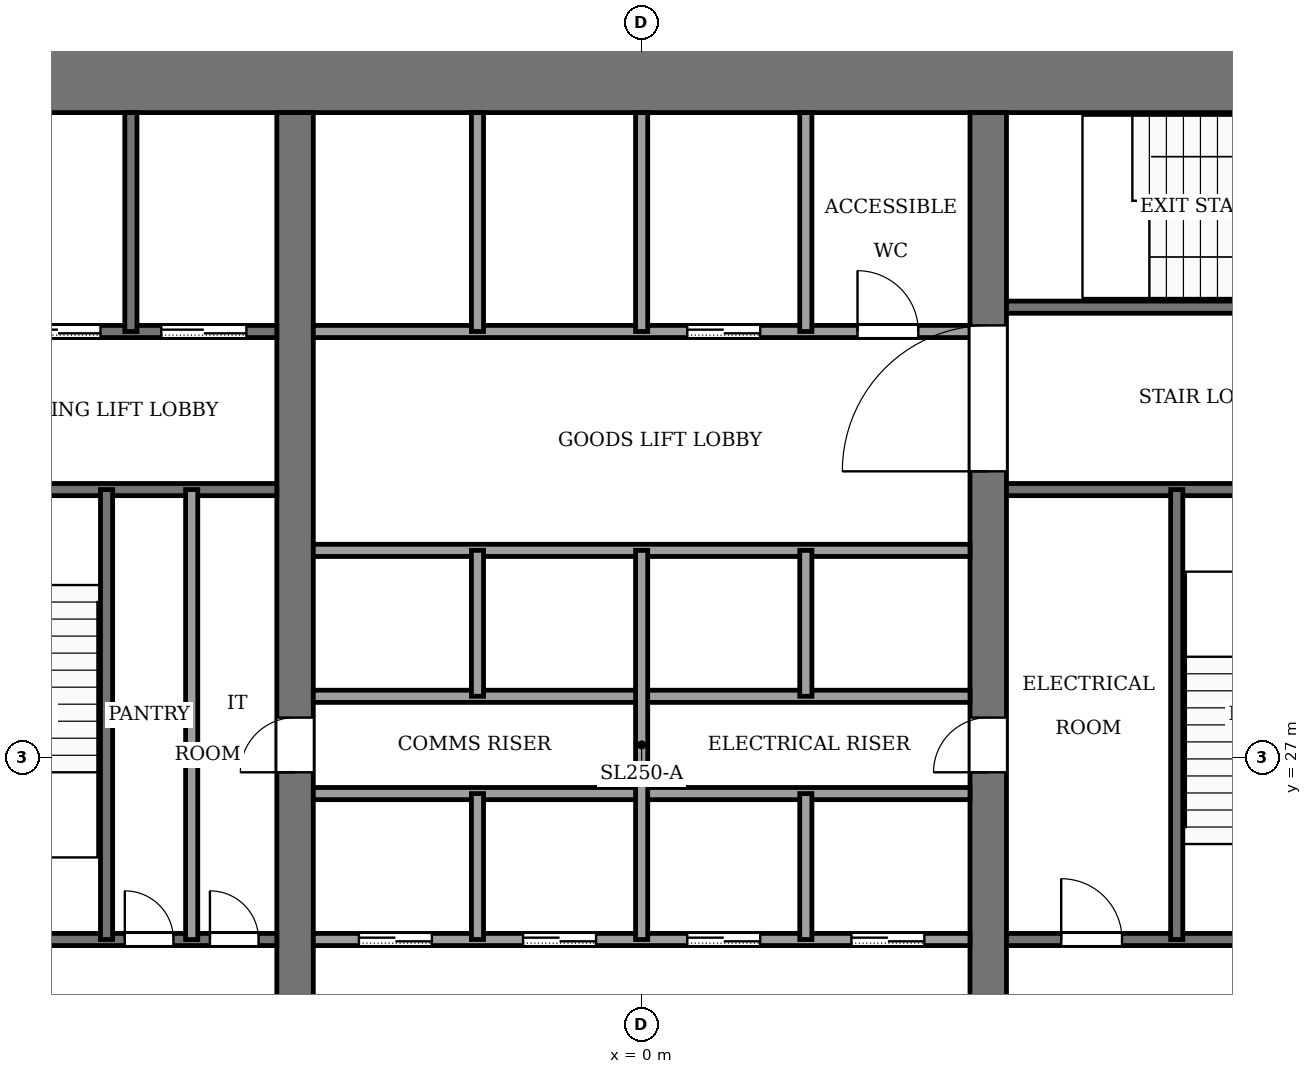
"""IFC4 building model, lengths in metres.
Left out: names, types, materials, properties, quantities, classifications, styles, units other than length and angle.
Written with IfcOpenShell. Run it as: python <this file> out.ifc"""

import sys

from ifc_helpers import new_model, si_unit, direction, frame, frame_2d, origin, place, context, subcontext, project, spatial, rectangle, extrude, element, fill, save


model = new_model("IFC4")
c1 = context("Model", 3, precision=1e-05, world=origin(), true_north=direction((0.0, 1.0)))
c2 = subcontext(c1, "Body", "Model", "MODEL_VIEW")
j1 = project(units=[si_unit("LENGTHUNIT", "METRE"), si_unit("PLANEANGLEUNIT", "RADIAN")], contexts=[c1])
p1 = place(None, origin())
s1 = spatial("IfcSite", under=j1, at=p1, CompositionType="ELEMENT")
p2 = place(p1, origin())
s2 = spatial("IfcBuilding", under=s1, at=p2, CompositionType="ELEMENT")
p3 = place(p2, frame((0.0, 0.0, 90.0)))
s3 = spatial("IfcBuildingStorey", under=s2, at=p3, CompositionType="ELEMENT", Elevation=90.0)
p4 = place(p3, frame((-13.8, 38.2, -0.13), z_axis=(0.0, 0.0, 1.0), x_axis=(1.0, 0.0, 0.0)))
e1 = element("IfcWall", 1, at=p4, inside=s3, PredefinedType="SHEAR", context=c2, shape_type="SweptSolid", body=[
    extrude(rectangle(XDim=27.6, YDim=1.2, at=frame_2d((13.8, 0.0))), origin(), (0.0, 0.0, 1.0), 4.0),
])
p5 = place(p3, frame((-5.7, 18.4, -0.13), z_axis=(0.0, 0.0, 1.0), x_axis=(0.0, 1.0, 0.0)))
e2 = element("IfcWall", 2, at=p5, inside=s3, PredefinedType="SHEAR", context=c2, shape_type="SweptSolid", body=[
    extrude(rectangle(XDim=19.2, YDim=0.6, at=frame_2d((9.6, 0.0))), origin(), (0.0, 0.0, 1.0), 4.0),
])
p6 = place(p5, frame((8.35, 0.0, 0.13)))
e3 = element("IfcOpeningElement", 3, at=p6, cuts=e2, PredefinedType="OPENING", context=c2, shape_type="SweptSolid", body=[
    extrude(rectangle(XDim=0.9, YDim=2.1, at=frame_2d((0.45, 1.05))), frame((0.0, 0.31, 0.0), z_axis=(0.0, -1.0, 0.0), x_axis=(1.0, 0.0, 0.0)), (0.0, 0.0, 1.0), 0.62),
])
p7 = place(p3, frame((5.7, 18.4, -0.13), z_axis=(0.0, 0.0, 1.0), x_axis=(0.0, 1.0, 0.0)))
e4 = element("IfcWall", 4, at=p7, inside=s3, PredefinedType="SHEAR", context=c2, shape_type="SweptSolid", body=[
    extrude(rectangle(XDim=19.2, YDim=0.6, at=frame_2d((9.6, 0.0))), origin(), (0.0, 0.0, 1.0), 4.0),
])
p8 = place(p7, frame((8.35, 0.0, 0.13)))
e5 = element("IfcOpeningElement", 5, at=p8, cuts=e4, PredefinedType="OPENING", context=c2, shape_type="SweptSolid", body=[
    extrude(rectangle(XDim=0.9, YDim=2.1, at=frame_2d((0.45, 1.05))), frame((0.0, 0.31, 0.0), z_axis=(0.0, -1.0, 0.0), x_axis=(1.0, 0.0, 0.0)), (0.0, 0.0, 1.0), 0.62),
])
p9 = place(p7, frame((13.3, 0.0, 0.13)))
e6 = element("IfcOpeningElement", 6, at=p9, cuts=e4, PredefinedType="OPENING", context=c2, shape_type="SweptSolid", body=[
    extrude(rectangle(XDim=2.4, YDim=2.4, at=frame_2d((1.2, 1.2))), frame((0.0, 0.31, 0.0), z_axis=(0.0, -1.0, 0.0), x_axis=(1.0, 0.0, 0.0)), (0.0, 0.0, 1.0), 0.62),
])
p10 = place(p3, frame((-12.6, 24.0, 0.0), z_axis=(0.0, 0.0, 1.0), x_axis=(1.0, 0.0, 0.0)))
e7 = element("IfcWall", 7, at=p10, inside=s3, PredefinedType="PARTITIONING", context=c2, shape_type="SweptSolid", body=[
    extrude(rectangle(XDim=6.6, YDim=0.2, at=frame_2d((3.3, 0.0))), origin(), (0.0, 0.0, 1.0), 3.87),
])
p11 = place(p10, frame((4.1, 0.0, 0.0)))
e8 = element("IfcOpeningElement", 8, at=p11, cuts=e7, PredefinedType="OPENING", context=c2, shape_type="SweptSolid", body=[
    extrude(rectangle(XDim=0.8, YDim=2.1, at=frame_2d((0.4, 1.05))), frame((0.0, 0.11, 0.0), z_axis=(0.0, -1.0, 0.0), x_axis=(1.0, 0.0, 0.0)), (0.0, 0.0, 1.0), 0.22),
])
p12 = place(p10, frame((5.5, 0.0, 0.0)))
e9 = element("IfcOpeningElement", 9, at=p12, cuts=e7, PredefinedType="OPENING", context=c2, shape_type="SweptSolid", body=[
    extrude(rectangle(XDim=0.8, YDim=2.1, at=frame_2d((0.4, 1.05))), frame((0.0, 0.11, 0.0), z_axis=(0.0, -1.0, 0.0), x_axis=(1.0, 0.0, 0.0)), (0.0, 0.0, 1.0), 0.22),
])
p13 = place(p3, frame((-5.4, 24.0, 0.0), z_axis=(0.0, 0.0, 1.0), x_axis=(1.0, 0.0, 0.0)))
e10 = element("IfcWall", 10, at=p13, inside=s3, PredefinedType="PARTITIONING", context=c2, shape_type="SweptSolid", body=[
    extrude(rectangle(XDim=10.8, YDim=0.2, at=frame_2d((5.4, 0.0))), origin(), (0.0, 0.0, 1.0), 3.87),
])
p14 = place(p13, frame((0.75, 0.0, 0.0)))
e11 = element("IfcOpeningElement", 11, at=p14, cuts=e10, PredefinedType="OPENING", context=c2, shape_type="SweptSolid", body=[
    extrude(rectangle(XDim=1.2, YDim=2.2, at=frame_2d((0.6, 1.1))), frame((0.0, 0.11, 0.0), z_axis=(0.0, -1.0, 0.0), x_axis=(1.0, 0.0, 0.0)), (0.0, 0.0, 1.0), 0.22),
])
p15 = place(p13, frame((3.45, 0.0, 0.0)))
e12 = element("IfcOpeningElement", 12, at=p15, cuts=e10, PredefinedType="OPENING", context=c2, shape_type="SweptSolid", body=[
    extrude(rectangle(XDim=1.2, YDim=2.2, at=frame_2d((0.6, 1.1))), frame((0.0, 0.11, 0.0), z_axis=(0.0, -1.0, 0.0), x_axis=(1.0, 0.0, 0.0)), (0.0, 0.0, 1.0), 0.22),
])
p16 = place(p13, frame((6.15, 0.0, 0.0)))
e13 = element("IfcOpeningElement", 13, at=p16, cuts=e10, PredefinedType="OPENING", context=c2, shape_type="SweptSolid", body=[
    extrude(rectangle(XDim=1.2, YDim=2.2, at=frame_2d((0.6, 1.1))), frame((0.0, 0.11, 0.0), z_axis=(0.0, -1.0, 0.0), x_axis=(1.0, 0.0, 0.0)), (0.0, 0.0, 1.0), 0.22),
])
p17 = place(p13, frame((8.85, 0.0, 0.0)))
e14 = element("IfcOpeningElement", 14, at=p17, cuts=e10, PredefinedType="OPENING", context=c2, shape_type="SweptSolid", body=[
    extrude(rectangle(XDim=1.2, YDim=2.2, at=frame_2d((0.6, 1.1))), frame((0.0, 0.11, 0.0), z_axis=(0.0, -1.0, 0.0), x_axis=(1.0, 0.0, 0.0)), (0.0, 0.0, 1.0), 0.22),
])
p18 = place(p3, frame((6.0, 24.0, 0.0), z_axis=(0.0, 0.0, 1.0), x_axis=(1.0, 0.0, 0.0)))
e15 = element("IfcWall", 15, at=p18, inside=s3, PredefinedType="PARTITIONING", context=c2, shape_type="SweptSolid", body=[
    extrude(rectangle(XDim=6.6, YDim=0.2, at=frame_2d((3.3, 0.0))), origin(), (0.0, 0.0, 1.0), 3.87),
])
p19 = place(p18, frame((0.9, 0.0, 0.0)))
e16 = element("IfcOpeningElement", 16, at=p19, cuts=e15, PredefinedType="OPENING", context=c2, shape_type="SweptSolid", body=[
    extrude(rectangle(XDim=1.0, YDim=2.1, at=frame_2d((0.5, 1.05))), frame((0.0, 0.11, 0.0), z_axis=(0.0, -1.0, 0.0), x_axis=(1.0, 0.0, 0.0)), (0.0, 0.0, 1.0), 0.22),
])
p20 = place(p18, frame((4.4, 0.0, 0.0)))
e17 = element("IfcOpeningElement", 17, at=p20, cuts=e15, PredefinedType="OPENING", context=c2, shape_type="SweptSolid", body=[
    extrude(rectangle(XDim=1.2, YDim=2.2, at=frame_2d((0.6, 1.1))), frame((0.0, 0.11, 0.0), z_axis=(0.0, -1.0, 0.0), x_axis=(1.0, 0.0, 0.0)), (0.0, 0.0, 1.0), 0.22),
])
for number, where, z_axis, x_axis in (
    (18, (-5.4, 26.4, 0.0), (0.0, 0.0, 1.0), (1.0, 0.0, 0.0)),
    (19, (-5.4, 28.0, 0.0), (0.0, 0.0, 1.0), (1.0, 0.0, 0.0)),
    (20, (-5.4, 30.4, 0.0), (0.0, 0.0, 1.0), (1.0, 0.0, 0.0)),
):
    element("IfcWall", number, at=place(p3, frame(where, z_axis=z_axis, x_axis=x_axis)), inside=s3, PredefinedType="PARTITIONING", context=c2, shape_type="SweptSolid", body=[
        extrude(rectangle(XDim=10.8, YDim=0.2, at=frame_2d((5.4, 0.0))), origin(), (0.0, 0.0, 1.0), 3.87),
    ])
p21 = place(p3, frame((-12.6, 31.4, 0.0), z_axis=(0.0, 0.0, 1.0), x_axis=(1.0, 0.0, 0.0)))
e21 = element("IfcWall", 21, at=p21, inside=s3, PredefinedType="PARTITIONING", context=c2, shape_type="SweptSolid", body=[
    extrude(rectangle(XDim=6.6, YDim=0.2, at=frame_2d((3.3, 0.0))), origin(), (0.0, 0.0, 1.0), 3.87),
])
p22 = place(p21, frame((1.0, 0.0, 0.0)))
e22 = element("IfcOpeningElement", 22, at=p22, cuts=e21, PredefinedType="OPENING", context=c2, shape_type="SweptSolid", body=[
    extrude(rectangle(XDim=1.2, YDim=2.2, at=frame_2d((0.6, 1.1))), frame((0.0, 0.11, 0.0), z_axis=(0.0, -1.0, 0.0), x_axis=(1.0, 0.0, 0.0)), (0.0, 0.0, 1.0), 0.22),
])
p23 = place(p3, frame((6.0, 31.4, 0.0), z_axis=(0.0, 0.0, 1.0), x_axis=(1.0, 0.0, 0.0)))
e23 = element("IfcWall", 23, at=p23, inside=s3, PredefinedType="PARTITIONING", context=c2, shape_type="SweptSolid", body=[
    extrude(rectangle(XDim=6.6, YDim=0.2, at=frame_2d((3.3, 0.0))), origin(), (0.0, 0.0, 1.0), 3.87),
])
p24 = place(p3, frame((-12.6, 34.0, 0.0), z_axis=(0.0, 0.0, 1.0), x_axis=(1.0, 0.0, 0.0)))
e24 = element("IfcWall", 24, at=p24, inside=s3, PredefinedType="PARTITIONING", context=c2, shape_type="SweptSolid", body=[
    extrude(rectangle(XDim=6.6, YDim=0.2, at=frame_2d((3.3, 0.0))), origin(), (0.0, 0.0, 1.0), 3.87),
])
p25 = place(p24, frame((4.7, 0.0, 0.0)))
e25 = element("IfcOpeningElement", 25, at=p25, cuts=e24, PredefinedType="OPENING", context=c2, shape_type="SweptSolid", body=[
    extrude(rectangle(XDim=1.4, YDim=2.2, at=frame_2d((0.7, 1.1))), frame((0.0, 0.11, 0.0), z_axis=(0.0, -1.0, 0.0), x_axis=(1.0, 0.0, 0.0)), (0.0, 0.0, 1.0), 0.22),
])
p26 = place(p24, frame((2.3, 0.0, 0.0)))
e26 = element("IfcOpeningElement", 26, at=p26, cuts=e24, PredefinedType="OPENING", context=c2, shape_type="SweptSolid", body=[
    extrude(rectangle(XDim=1.4, YDim=2.2, at=frame_2d((0.7, 1.1))), frame((0.0, 0.11, 0.0), z_axis=(0.0, -1.0, 0.0), x_axis=(1.0, 0.0, 0.0)), (0.0, 0.0, 1.0), 0.22),
])
p27 = place(p24, frame((0.45, 0.0, 0.0)))
e27 = element("IfcOpeningElement", 27, at=p27, cuts=e24, PredefinedType="OPENING", context=c2, shape_type="SweptSolid", body=[
    extrude(rectangle(XDim=0.9, YDim=2.1, at=frame_2d((0.45, 1.05))), frame((0.0, 0.11, 0.0), z_axis=(0.0, -1.0, 0.0), x_axis=(1.0, 0.0, 0.0)), (0.0, 0.0, 1.0), 0.22),
])
p28 = place(p3, frame((-5.4, 34.0, 0.0), z_axis=(0.0, 0.0, 1.0), x_axis=(1.0, 0.0, 0.0)))
e28 = element("IfcWall", 28, at=p28, inside=s3, PredefinedType="PARTITIONING", context=c2, shape_type="SweptSolid", body=[
    extrude(rectangle(XDim=10.8, YDim=0.2, at=frame_2d((5.4, 0.0))), origin(), (0.0, 0.0, 1.0), 3.87),
])
p29 = place(p28, frame((6.15, 0.0, 0.0)))
e29 = element("IfcOpeningElement", 29, at=p29, cuts=e28, PredefinedType="OPENING", context=c2, shape_type="SweptSolid", body=[
    extrude(rectangle(XDim=1.2, YDim=2.2, at=frame_2d((0.6, 1.1))), frame((0.0, 0.11, 0.0), z_axis=(0.0, -1.0, 0.0), x_axis=(1.0, 0.0, 0.0)), (0.0, 0.0, 1.0), 0.22),
])
p30 = place(p28, frame((8.95, 0.0, 0.0)))
e30 = element("IfcOpeningElement", 30, at=p30, cuts=e28, PredefinedType="OPENING", context=c2, shape_type="SweptSolid", body=[
    extrude(rectangle(XDim=1.0, YDim=2.1, at=frame_2d((0.5, 1.05))), frame((0.0, 0.11, 0.0), z_axis=(0.0, -1.0, 0.0), x_axis=(1.0, 0.0, 0.0)), (0.0, 0.0, 1.0), 0.22),
])
p31 = place(p3, frame((6.0, 34.4, 0.0), z_axis=(0.0, 0.0, 1.0), x_axis=(1.0, 0.0, 0.0)))
e31 = element("IfcWall", 31, at=p31, inside=s3, PredefinedType="PARTITIONING", context=c2, shape_type="SweptSolid", body=[
    extrude(rectangle(XDim=6.6, YDim=0.2, at=frame_2d((3.3, 0.0))), origin(), (0.0, 0.0, 1.0), 3.87),
])
p32 = place(p31, frame((4.8, 0.0, 0.0)))
e32 = element("IfcOpeningElement", 32, at=p32, cuts=e31, PredefinedType="OPENING", context=c2, shape_type="SweptSolid", body=[
    extrude(rectangle(XDim=1.2, YDim=2.2, at=frame_2d((0.6, 1.1))), frame((0.0, 0.11, 0.0), z_axis=(0.0, -1.0, 0.0), x_axis=(1.0, 0.0, 0.0)), (0.0, 0.0, 1.0), 0.22),
])
p33 = place(p3, frame((-8.8, 24.0, 0.0), z_axis=(0.0, 0.0, 1.0), x_axis=(0.0, 1.0, 0.0)))
e33 = element("IfcWall", 33, at=p33, inside=s3, PredefinedType="PARTITIONING", context=c2, shape_type="SweptSolid", body=[
    extrude(rectangle(XDim=7.4, YDim=0.2, at=frame_2d((3.7, 0.0))), origin(), (0.0, 0.0, 1.0), 3.87),
])
p34 = place(p3, frame((-8.4, 34.0, 0.0), z_axis=(0.0, 0.0, 1.0), x_axis=(0.0, 1.0, 0.0)))
e34 = element("IfcWall", 34, at=p34, inside=s3, PredefinedType="PARTITIONING", context=c2, shape_type="SweptSolid", body=[
    extrude(rectangle(XDim=3.6, YDim=0.2, at=frame_2d((1.8, 0.0))), origin(), (0.0, 0.0, 1.0), 3.87),
])
p35 = place(p3, frame((-7.4, 24.0, 0.0), z_axis=(0.0, 0.0, 1.0), x_axis=(0.0, 1.0, 0.0)))
e35 = element("IfcWall", 35, at=p35, inside=s3, PredefinedType="PARTITIONING", context=c2, shape_type="SweptSolid", body=[
    extrude(rectangle(XDim=7.4, YDim=0.2, at=frame_2d((3.7, 0.0))), origin(), (0.0, 0.0, 1.0), 3.87),
])
for number, where, z_axis, x_axis in (
    (36, (-2.7, 24.0, 0.0), (0.0, 0.0, 1.0), (0.0, 1.0, 0.0)),
    (37, (-2.7, 28.0, 0.0), (0.0, 0.0, 1.0), (0.0, 1.0, 0.0)),
):
    element("IfcWall", number, at=place(p3, frame(where, z_axis=z_axis, x_axis=x_axis)), inside=s3, PredefinedType="PARTITIONING", context=c2, shape_type="SweptSolid", body=[
        extrude(rectangle(XDim=2.4, YDim=0.2, at=frame_2d((1.2, 0.0))), origin(), (0.0, 0.0, 1.0), 3.87),
    ])
p36 = place(p3, frame((-2.7, 34.0, 0.0), z_axis=(0.0, 0.0, 1.0), x_axis=(0.0, 1.0, 0.0)))
e38 = element("IfcWall", 38, at=p36, inside=s3, PredefinedType="PARTITIONING", context=c2, shape_type="SweptSolid", body=[
    extrude(rectangle(XDim=3.6, YDim=0.2, at=frame_2d((1.8, 0.0))), origin(), (0.0, 0.0, 1.0), 3.87),
])
p37 = place(p3, frame((0.0, 24.0, 0.0), z_axis=(0.0, 0.0, 1.0), x_axis=(0.0, 1.0, 0.0)))
e39 = element("IfcWall", 39, at=p37, inside=s3, PredefinedType="PARTITIONING", context=c2, shape_type="SweptSolid", body=[
    extrude(rectangle(XDim=6.4, YDim=0.2, at=frame_2d((3.2, 0.0))), origin(), (0.0, 0.0, 1.0), 3.87),
])
p38 = place(p3, frame((0.0, 34.0, 0.0), z_axis=(0.0, 0.0, 1.0), x_axis=(0.0, 1.0, 0.0)))
e40 = element("IfcWall", 40, at=p38, inside=s3, PredefinedType="PARTITIONING", context=c2, shape_type="SweptSolid", body=[
    extrude(rectangle(XDim=3.6, YDim=0.2, at=frame_2d((1.8, 0.0))), origin(), (0.0, 0.0, 1.0), 3.87),
])
for number, where, z_axis, x_axis in (
    (41, (2.7, 24.0, 0.0), (0.0, 0.0, 1.0), (0.0, 1.0, 0.0)),
    (42, (2.7, 28.0, 0.0), (0.0, 0.0, 1.0), (0.0, 1.0, 0.0)),
):
    element("IfcWall", number, at=place(p3, frame(where, z_axis=z_axis, x_axis=x_axis)), inside=s3, PredefinedType="PARTITIONING", context=c2, shape_type="SweptSolid", body=[
        extrude(rectangle(XDim=2.4, YDim=0.2, at=frame_2d((1.2, 0.0))), origin(), (0.0, 0.0, 1.0), 3.87),
    ])
p39 = place(p3, frame((2.7, 34.0, 0.0), z_axis=(0.0, 0.0, 1.0), x_axis=(0.0, 1.0, 0.0)))
e43 = element("IfcWall", 43, at=p39, inside=s3, PredefinedType="PARTITIONING", context=c2, shape_type="SweptSolid", body=[
    extrude(rectangle(XDim=3.6, YDim=0.2, at=frame_2d((1.8, 0.0))), origin(), (0.0, 0.0, 1.0), 3.87),
])
p40 = place(p3, frame((8.8, 24.0, 0.0), z_axis=(0.0, 0.0, 1.0), x_axis=(0.0, 1.0, 0.0)))
e44 = element("IfcWall", 44, at=p40, inside=s3, PredefinedType="PARTITIONING", context=c2, shape_type="SweptSolid", body=[
    extrude(rectangle(XDim=7.4, YDim=0.2, at=frame_2d((3.7, 0.0))), origin(), (0.0, 0.0, 1.0), 3.87),
])
p41 = place(p14, origin())
e45 = element("IfcDoor", 45, at=p41, inside=s3, OperationType="SLIDING_TO_LEFT", PredefinedType="DOOR", context=c2, shape_type="SweptSolid", body=[
    extrude(rectangle(XDim=1.2, YDim=2.2, at=frame_2d((0.6, 1.1))), frame((0.0, 0.025, 0.0), z_axis=(0.0, -1.0, 0.0), x_axis=(1.0, 0.0, 0.0)), (0.0, 0.0, 1.0), 0.05),
])
fill(e11, e45)
p42 = place(p15, origin())
e46 = element("IfcDoor", 46, at=p42, inside=s3, OperationType="SLIDING_TO_LEFT", PredefinedType="DOOR", context=c2, shape_type="SweptSolid", body=[
    extrude(rectangle(XDim=1.2, YDim=2.2, at=frame_2d((0.6, 1.1))), frame((0.0, 0.025, 0.0), z_axis=(0.0, -1.0, 0.0), x_axis=(1.0, 0.0, 0.0)), (0.0, 0.0, 1.0), 0.05),
])
fill(e12, e46)
p43 = place(p16, origin())
e47 = element("IfcDoor", 47, at=p43, inside=s3, OperationType="SLIDING_TO_LEFT", PredefinedType="DOOR", context=c2, shape_type="SweptSolid", body=[
    extrude(rectangle(XDim=1.2, YDim=2.2, at=frame_2d((0.6, 1.1))), frame((0.0, 0.025, 0.0), z_axis=(0.0, -1.0, 0.0), x_axis=(1.0, 0.0, 0.0)), (0.0, 0.0, 1.0), 0.05),
])
fill(e13, e47)
p44 = place(p17, origin())
e48 = element("IfcDoor", 48, at=p44, inside=s3, OperationType="SLIDING_TO_LEFT", PredefinedType="DOOR", context=c2, shape_type="SweptSolid", body=[
    extrude(rectangle(XDim=1.2, YDim=2.2, at=frame_2d((0.6, 1.1))), frame((0.0, 0.025, 0.0), z_axis=(0.0, -1.0, 0.0), x_axis=(1.0, 0.0, 0.0)), (0.0, 0.0, 1.0), 0.05),
])
fill(e14, e48)
p45 = place(p29, origin())
e49 = element("IfcDoor", 49, at=p45, inside=s3, OperationType="SLIDING_TO_LEFT", PredefinedType="DOOR", context=c2, shape_type="SweptSolid", body=[
    extrude(rectangle(XDim=1.2, YDim=2.2, at=frame_2d((0.6, 1.1))), frame((0.0, 0.025, 0.0), z_axis=(0.0, -1.0, 0.0), x_axis=(1.0, 0.0, 0.0)), (0.0, 0.0, 1.0), 0.05),
])
fill(e29, e49)
p46 = place(p25, origin())
e50 = element("IfcDoor", 50, at=p46, inside=s3, OperationType="SLIDING_TO_LEFT", PredefinedType="DOOR", context=c2, shape_type="SweptSolid", body=[
    extrude(rectangle(XDim=1.4, YDim=2.2, at=frame_2d((0.7, 1.1))), frame((0.0, 0.025, 0.0), z_axis=(0.0, -1.0, 0.0), x_axis=(1.0, 0.0, 0.0)), (0.0, 0.0, 1.0), 0.05),
])
fill(e25, e50)
p47 = place(p26, origin())
e51 = element("IfcDoor", 51, at=p47, inside=s3, OperationType="SLIDING_TO_LEFT", PredefinedType="DOOR", context=c2, shape_type="SweptSolid", body=[
    extrude(rectangle(XDim=1.4, YDim=2.2, at=frame_2d((0.7, 1.1))), frame((0.0, 0.025, 0.0), z_axis=(0.0, -1.0, 0.0), x_axis=(1.0, 0.0, 0.0)), (0.0, 0.0, 1.0), 0.05),
])
fill(e26, e51)
p48 = place(p11, origin())
e52 = element("IfcDoor", 52, at=p48, inside=s3, OperationType="SINGLE_SWING_LEFT", PredefinedType="DOOR", context=c2, shape_type="SweptSolid", body=[
    extrude(rectangle(XDim=0.8, YDim=2.1, at=frame_2d((0.4, 1.05))), frame((0.0, 0.025, 0.0), z_axis=(0.0, -1.0, 0.0), x_axis=(1.0, 0.0, 0.0)), (0.0, 0.0, 1.0), 0.05),
])
fill(e8, e52)
p49 = place(p12, origin())
e53 = element("IfcDoor", 53, at=p49, inside=s3, OperationType="SINGLE_SWING_RIGHT", PredefinedType="DOOR", context=c2, shape_type="SweptSolid", body=[
    extrude(rectangle(XDim=0.8, YDim=2.1, at=frame_2d((0.4, 1.05))), frame((0.0, 0.025, 0.0), z_axis=(0.0, -1.0, 0.0), x_axis=(1.0, 0.0, 0.0)), (0.0, 0.0, 1.0), 0.05),
])
fill(e9, e53)
p50 = place(p19, origin())
e54 = element("IfcDoor", 54, at=p50, inside=s3, OperationType="SINGLE_SWING_RIGHT", PredefinedType="DOOR", context=c2, shape_type="SweptSolid", body=[
    extrude(rectangle(XDim=1.0, YDim=2.1, at=frame_2d((0.5, 1.05))), frame((0.0, 0.025, 0.0), z_axis=(0.0, -1.0, 0.0), x_axis=(1.0, 0.0, 0.0)), (0.0, 0.0, 1.0), 0.05),
])
fill(e16, e54)
p51 = place(p30, origin())
e55 = element("IfcDoor", 55, at=p51, inside=s3, OperationType="SINGLE_SWING_LEFT", PredefinedType="DOOR", context=c2, shape_type="SweptSolid", body=[
    extrude(rectangle(XDim=1.0, YDim=2.1, at=frame_2d((0.5, 1.05))), frame((0.0, 0.025, 0.0), z_axis=(0.0, -1.0, 0.0), x_axis=(1.0, 0.0, 0.0)), (0.0, 0.0, 1.0), 0.05),
])
fill(e30, e55)
p52 = place(p6, origin())
e56 = element("IfcDoor", 56, at=p52, inside=s3, OperationType="SINGLE_SWING_LEFT", PredefinedType="DOOR", context=c2, shape_type="SweptSolid", body=[
    extrude(rectangle(XDim=0.9, YDim=2.1, at=frame_2d((0.45, 1.05))), frame((0.0, 0.025, 0.0), z_axis=(0.0, -1.0, 0.0), x_axis=(1.0, 0.0, 0.0)), (0.0, 0.0, 1.0), 0.05),
])
fill(e3, e56)
p53 = place(p8, origin())
e57 = element("IfcDoor", 57, at=p53, inside=s3, OperationType="SINGLE_SWING_RIGHT", PredefinedType="DOOR", context=c2, shape_type="SweptSolid", body=[
    extrude(rectangle(XDim=0.9, YDim=2.1, at=frame_2d((0.45, 1.05))), frame((0.0, 0.025, 0.0), z_axis=(0.0, -1.0, 0.0), x_axis=(1.0, 0.0, 0.0)), (0.0, 0.0, 1.0), 0.05),
])
fill(e5, e57)
p54 = place(p9, origin())
e58 = element("IfcDoor", 58, at=p54, inside=s3, OperationType="DOUBLE_DOOR_SINGLE_SWING", PredefinedType="DOOR", context=c2, shape_type="SweptSolid", body=[
    extrude(rectangle(XDim=2.4, YDim=2.4, at=frame_2d((1.2, 1.2))), frame((0.0, 0.025, 0.0), z_axis=(0.0, -1.0, 0.0), x_axis=(1.0, 0.0, 0.0)), (0.0, 0.0, 1.0), 0.05),
])
fill(e6, e58)
save(model, sys.argv[1])
